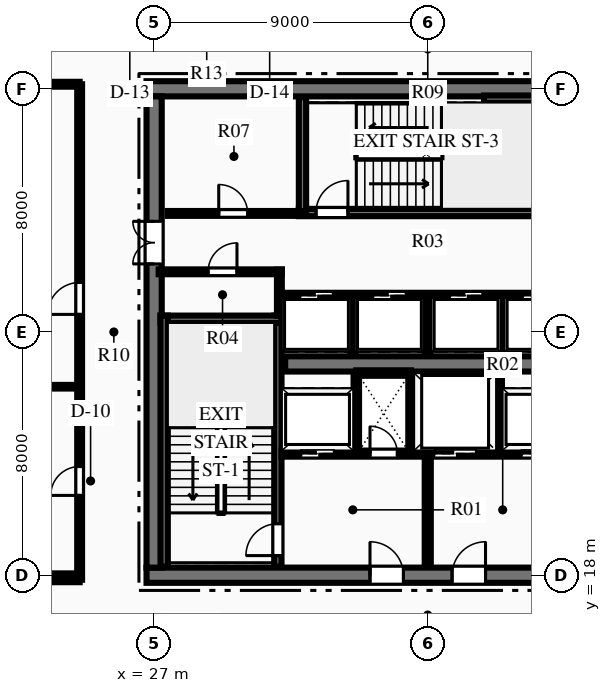
"""IFC4 building model, lengths in metres.
Left out: names, types, materials, properties, quantities, classifications, styles, units other than length and angle.
Written with IfcOpenShell. Run it as: python <this file> out.ifc"""

import sys

from ifc_helpers import new_model, si_unit, direction, frame, frame_2d, origin, place, context, subcontext, project, spatial, rectangle, extrude, element, fill, save


model = new_model("IFC4")
c1 = context("Model", 3, precision=1e-05, world=origin(), true_north=direction((0.0, 1.0)))
c2 = subcontext(c1, "Body", "Model", "MODEL_VIEW")
j1 = project(units=[si_unit("LENGTHUNIT", "METRE"), si_unit("PLANEANGLEUNIT", "RADIAN")], contexts=[c1])
p1 = place(None, origin())
s1 = spatial("IfcSite", under=j1, at=p1, CompositionType="ELEMENT")
p2 = place(p1, origin())
s2 = spatial("IfcBuilding", under=s1, at=p2, CompositionType="ELEMENT")
p3 = place(p2, frame((0.0, 0.0, 198.45)))
s3 = spatial("IfcBuildingStorey", under=s2, at=p3, CompositionType="ELEMENT", Elevation=198.45)
p4 = place(p3, frame((26.75, 18.0, 0.0), z_axis=(0.0, 0.0, 1.0), x_axis=(1.0, 0.0, 0.0)))
e1 = element("IfcWall", 1, at=p4, inside=s3, PredefinedType="SHEAR", context=c2, shape_type="SweptSolid", body=[
    extrude(rectangle(XDim=18.5, YDim=0.5, at=frame_2d((9.25, 0.0))), origin(), (0.0, 0.0, 1.0), 3.75),
])
p5 = place(p4, frame((7.35, 0.0, 0.0)))
e2 = element("IfcOpeningElement", 2, at=p5, cuts=e1, PredefinedType="OPENING", context=c2, shape_type="SweptSolid", body=[
    extrude(rectangle(XDim=1.1, YDim=2.15, at=frame_2d((0.55, 1.075))), frame((0.0, 0.26, 0.0), z_axis=(0.0, -1.0, 0.0), x_axis=(1.0, 0.0, 0.0)), (0.0, 0.0, 1.0), 0.52),
])
p6 = place(p4, frame((10.05, 0.0, 0.0)))
e3 = element("IfcOpeningElement", 3, at=p6, cuts=e1, PredefinedType="OPENING", context=c2, shape_type="SweptSolid", body=[
    extrude(rectangle(XDim=1.1, YDim=2.15, at=frame_2d((0.55, 1.075))), frame((0.0, 0.26, 0.0), z_axis=(0.0, -1.0, 0.0), x_axis=(1.0, 0.0, 0.0)), (0.0, 0.0, 1.0), 0.52),
])
p7 = place(p3, frame((26.75, 34.0, 0.0), z_axis=(0.0, 0.0, 1.0), x_axis=(1.0, 0.0, 0.0)))
e4 = element("IfcWall", 4, at=p7, inside=s3, PredefinedType="SHEAR", context=c2, shape_type="SweptSolid", body=[
    extrude(rectangle(XDim=18.5, YDim=0.5, at=frame_2d((9.25, 0.0))), origin(), (0.0, 0.0, 1.0), 3.75),
])
p8 = place(p7, frame((13.935, 0.0, 0.0)))
e5 = element("IfcOpeningElement", 5, at=p8, cuts=e4, PredefinedType="OPENING", context=c2, shape_type="SweptSolid", body=[
    extrude(rectangle(XDim=1.1, YDim=2.15, at=frame_2d((0.55, 1.075))), frame((0.0, 0.26, 0.0), z_axis=(0.0, -1.0, 0.0), x_axis=(1.0, 0.0, 0.0)), (0.0, 0.0, 1.0), 0.52),
])
p9 = place(p7, frame((16.185, 0.0, 0.0)))
e6 = element("IfcOpeningElement", 6, at=p9, cuts=e4, PredefinedType="OPENING", context=c2, shape_type="SweptSolid", body=[
    extrude(rectangle(XDim=1.1, YDim=2.15, at=frame_2d((0.55, 1.075))), frame((0.0, 0.26, 0.0), z_axis=(0.0, -1.0, 0.0), x_axis=(1.0, 0.0, 0.0)), (0.0, 0.0, 1.0), 0.52),
])
p10 = place(p3, frame((27.0, 18.25, 0.0), z_axis=(0.0, 0.0, 1.0), x_axis=(0.0, 1.0, 0.0)))
e7 = element("IfcWall", 7, at=p10, inside=s3, PredefinedType="SHEAR", context=c2, shape_type="SweptSolid", body=[
    extrude(rectangle(XDim=15.5, YDim=0.5, at=frame_2d((7.75, 0.0))), origin(), (0.0, 0.0, 1.0), 3.75),
])
p11 = place(p10, frame((9.99, 0.0, 0.0)))
e8 = element("IfcOpeningElement", 8, at=p11, cuts=e7, PredefinedType="OPENING", context=c2, shape_type="SweptSolid", body=[
    extrude(rectangle(XDim=1.4, YDim=2.2, at=frame_2d((0.7, 1.1))), frame((0.0, 0.26, 0.0), z_axis=(0.0, -1.0, 0.0), x_axis=(1.0, 0.0, 0.0)), (0.0, 0.0, 1.0), 0.52),
])
p12 = place(p3, frame((31.31, 24.95, 0.0), z_axis=(0.0, 0.0, 1.0), x_axis=(1.0, 0.0, 0.0)))
e9 = element("IfcWall", 9, at=p12, inside=s3, PredefinedType="SHEAR", context=c2, shape_type="SweptSolid", body=[
    extrude(rectangle(XDim=9.38, YDim=0.5, at=frame_2d((4.69, 0.0))), origin(), (0.0, 0.0, 1.0), 3.75),
])
p13 = place(p3, frame((31.07, 18.28, 0.0), z_axis=(0.0, 0.0, 1.0), x_axis=(0.0, 1.0, 0.0)))
e10 = element("IfcWall", 10, at=p13, inside=s3, PredefinedType="SHEAR", context=c2, shape_type="SweptSolid", body=[
    extrude(rectangle(XDim=8.26, YDim=0.24, at=frame_2d((4.13, 0.0))), origin(), (0.0, 0.0, 1.0), 3.75),
])
p14 = place(p13, frame((0.365, 0.0, 0.0)))
e11 = element("IfcOpeningElement", 11, at=p14, cuts=e10, PredefinedType="OPENING", context=c2, shape_type="SweptSolid", body=[
    extrude(rectangle(XDim=1.05, YDim=2.15, at=frame_2d((0.525, 1.075))), frame((0.0, 0.13, 0.0), z_axis=(0.0, -1.0, 0.0), x_axis=(1.0, 0.0, 0.0)), (0.0, 0.0, 1.0), 0.26),
])
p15 = place(p3, frame((27.21, 26.42, 0.0), z_axis=(0.0, 0.0, 1.0), x_axis=(1.0, 0.0, 0.0)))
e12 = element("IfcWall", 12, at=p15, inside=s3, PredefinedType="SHEAR", context=c2, shape_type="SweptSolid", body=[
    extrude(rectangle(XDim=3.98, YDim=0.24, at=frame_2d((1.99, 0.0))), origin(), (0.0, 0.0, 1.0), 3.75),
])
p16 = place(p3, frame((27.33, 18.28, 0.0), z_axis=(0.0, 0.0, 1.0), x_axis=(0.0, 1.0, 0.0)))
e13 = element("IfcWall", 13, at=p16, inside=s3, PredefinedType="SHEAR", context=c2, shape_type="SweptSolid", body=[
    extrude(rectangle(XDim=8.26, YDim=0.24, at=frame_2d((4.13, 0.0))), origin(), (0.0, 0.0, 1.0), 3.75),
])
p17 = place(p3, frame((31.76, 29.93, 0.0), z_axis=(0.0, 0.0, 1.0), x_axis=(1.0, 0.0, 0.0)))
e14 = element("IfcWall", 14, at=p17, inside=s3, PredefinedType="SHEAR", context=c2, shape_type="SweptSolid", body=[
    extrude(rectangle(XDim=8.38, YDim=0.24, at=frame_2d((4.19, 0.0))), origin(), (0.0, 0.0, 1.0), 3.75),
])
p18 = place(p17, frame((0.565, 0.0, 0.0)))
e15 = element("IfcOpeningElement", 15, at=p18, cuts=e14, PredefinedType="OPENING", context=c2, shape_type="SweptSolid", body=[
    extrude(rectangle(XDim=1.05, YDim=2.15, at=frame_2d((0.525, 1.075))), frame((0.0, 0.13, 0.0), z_axis=(0.0, -1.0, 0.0), x_axis=(1.0, 0.0, 0.0)), (0.0, 0.0, 1.0), 0.26),
])
p19 = place(p3, frame((31.88, 29.93, 0.0), z_axis=(0.0, 0.0, 1.0), x_axis=(0.0, 1.0, 0.0)))
e16 = element("IfcWall", 16, at=p19, inside=s3, PredefinedType="SHEAR", context=c2, shape_type="SweptSolid", body=[
    extrude(rectangle(XDim=3.79, YDim=0.24, at=frame_2d((1.895, 0.0))), origin(), (0.0, 0.0, 1.0), 3.75),
])
p20 = place(p3, frame((37.85, 33.66, 0.0), z_axis=(0.0, 0.0, 1.0), x_axis=(1.0, 0.0, 0.0)))
e17 = element("IfcWall", 17, at=p20, inside=s3, PredefinedType="SHEAR", context=c2, shape_type="SweptSolid", body=[
    extrude(rectangle(XDim=2.29, YDim=0.24, at=frame_2d((1.145, 0.0))), origin(), (0.0, 0.0, 1.0), 3.75),
])
p21 = place(p3, frame((36.0, 18.28, 0.0), z_axis=(0.0, 0.0, 1.0), x_axis=(0.0, 1.0, 0.0)))
e18 = element("IfcWall", 18, at=p21, inside=s3, PredefinedType="PARTITIONING", context=c2, shape_type="SweptSolid", body=[
    extrude(rectangle(XDim=3.77, YDim=0.2, at=frame_2d((1.885, 0.0))), origin(), (0.0, 0.0, 1.0), 3.47),
])
p22 = place(p3, frame((31.19, 22.0, 0.0), z_axis=(0.0, 0.0, 1.0), x_axis=(1.0, 0.0, 0.0)))
e19 = element("IfcWall", 19, at=p22, inside=s3, PredefinedType="PARTITIONING", context=c2, shape_type="SweptSolid", body=[
    extrude(rectangle(XDim=4.69, YDim=0.2, at=frame_2d((2.345, 0.0))), origin(), (0.0, 0.0, 1.0), 3.47),
])
p23 = place(p22, frame((2.91, 0.0, 0.0)))
e20 = element("IfcOpeningElement", 20, at=p23, cuts=e19, PredefinedType="OPENING", context=c2, shape_type="SweptSolid", body=[
    extrude(rectangle(XDim=0.9, YDim=2.15, at=frame_2d((0.45, 1.075))), frame((0.0, 0.11, 0.0), z_axis=(0.0, -1.0, 0.0), x_axis=(1.0, 0.0, 0.0)), (0.0, 0.0, 1.0), 0.22),
])
p24 = place(p22, frame((0.635, 0.0, 0.0)))
e21 = element("IfcOpeningElement", 21, at=p24, cuts=e19, PredefinedType="OPENING", context=c2, shape_type="SweptSolid", body=[
    extrude(rectangle(XDim=1.1, YDim=2.15, at=frame_2d((0.55, 1.075))), frame((0.0, 0.11, 0.0), z_axis=(0.0, -1.0, 0.0), x_axis=(1.0, 0.0, 0.0)), (0.0, 0.0, 1.0), 0.22),
])
p25 = place(p3, frame((36.12, 22.0, 0.0), z_axis=(0.0, 0.0, 1.0), x_axis=(1.0, 0.0, 0.0)))
e22 = element("IfcWall", 22, at=p25, inside=s3, PredefinedType="PARTITIONING", context=c2, shape_type="SweptSolid", body=[
    extrude(rectangle(XDim=4.69, YDim=0.2, at=frame_2d((2.345, 0.0))), origin(), (0.0, 0.0, 1.0), 3.47),
])
p26 = place(p25, frame((2.955, 0.0, 0.0)))
e23 = element("IfcOpeningElement", 23, at=p26, cuts=e22, PredefinedType="OPENING", context=c2, shape_type="SweptSolid", body=[
    extrude(rectangle(XDim=1.1, YDim=2.15, at=frame_2d((0.55, 1.075))), frame((0.0, 0.11, 0.0), z_axis=(0.0, -1.0, 0.0), x_axis=(1.0, 0.0, 0.0)), (0.0, 0.0, 1.0), 0.22),
])
p27 = place(p25, frame((0.08, 0.0, 0.0)))
e24 = element("IfcOpeningElement", 24, at=p27, cuts=e22, PredefinedType="OPENING", context=c2, shape_type="SweptSolid", body=[
    extrude(rectangle(XDim=1.4, YDim=2.2, at=frame_2d((0.7, 1.1))), frame((0.0, 0.11, 0.0), z_axis=(0.0, -1.0, 0.0), x_axis=(1.0, 0.0, 0.0)), (0.0, 0.0, 1.0), 0.22),
])
for number, where, z_axis, x_axis in (
    (25, (33.65, 22.05, 0.0), (0.0, 0.0, 1.0), (0.0, 1.0, 0.0)),
    (26, (35.45, 22.05, 0.0), (0.0, 0.0, 1.0), (0.0, 1.0, 0.0)),
):
    element("IfcWall", number, at=place(p3, frame(where, z_axis=z_axis, x_axis=x_axis)), inside=s3, PredefinedType="PARTITIONING", context=c2, shape_type="SweptSolid", body=[
        extrude(rectangle(XDim=2.6, YDim=0.18, at=frame_2d((1.3, 0.0))), origin(), (0.0, 0.0, 1.0), 3.47),
    ])
p28 = place(p3, frame((33.65, 24.65, 0.0), z_axis=(0.0, 0.0, 1.0), x_axis=(1.0, 0.0, 0.0)))
e27 = element("IfcWall", 27, at=p28, inside=s3, PredefinedType="PARTITIONING", context=c2, shape_type="SweptSolid", body=[
    extrude(rectangle(XDim=1.8, YDim=0.18, at=frame_2d((0.9, 0.0))), origin(), (0.0, 0.0, 1.0), 3.47),
])
p29 = place(p3, frame((38.35, 22.05, 0.0), z_axis=(0.0, 0.0, 1.0), x_axis=(0.0, 1.0, 0.0)))
e28 = element("IfcWall", 28, at=p29, inside=s3, PredefinedType="PARTITIONING", context=c2, shape_type="SweptSolid", body=[
    extrude(rectangle(XDim=2.6, YDim=0.18, at=frame_2d((1.3, 0.0))), origin(), (0.0, 0.0, 1.0), 3.47),
])
p30 = place(p3, frame((27.15, 27.98, 0.0), z_axis=(0.0, 0.0, 1.0), x_axis=(1.0, 0.0, 0.0)))
e29 = element("IfcWall", 29, at=p30, inside=s3, PredefinedType="PARTITIONING", context=c2, shape_type="SweptSolid", body=[
    extrude(rectangle(XDim=4.05, YDim=0.16, at=frame_2d((2.025, 0.0))), origin(), (0.0, 0.0, 1.0), 3.47),
])
p31 = place(p30, frame((1.625, 0.0, 0.0)))
e30 = element("IfcOpeningElement", 30, at=p31, cuts=e29, PredefinedType="OPENING", context=c2, shape_type="SweptSolid", body=[
    extrude(rectangle(XDim=0.95, YDim=2.15, at=frame_2d((0.475, 1.075))), frame((0.0, 0.09, 0.0), z_axis=(0.0, -1.0, 0.0), x_axis=(1.0, 0.0, 0.0)), (0.0, 0.0, 1.0), 0.18),
])
p32 = place(p3, frame((31.12, 26.54, 0.0), z_axis=(0.0, 0.0, 1.0), x_axis=(0.0, 1.0, 0.0)))
e31 = element("IfcWall", 31, at=p32, inside=s3, PredefinedType="PARTITIONING", context=c2, shape_type="SweptSolid", body=[
    extrude(rectangle(XDim=1.51, YDim=0.16, at=frame_2d((0.755, 0.0))), origin(), (0.0, 0.0, 1.0), 3.47),
])
p33 = place(p3, frame((27.45, 29.9, 0.0), z_axis=(0.0, 0.0, 1.0), x_axis=(1.0, 0.0, 0.0)))
e32 = element("IfcWall", 32, at=p33, inside=s3, PredefinedType="PARTITIONING", context=c2, shape_type="SweptSolid", body=[
    extrude(rectangle(XDim=4.43, YDim=0.16, at=frame_2d((2.215, 0.0))), origin(), (0.0, 0.0, 1.0), 3.47),
])
p34 = place(p33, frame((1.675, 0.0, 0.0)))
e33 = element("IfcOpeningElement", 33, at=p34, cuts=e32, PredefinedType="OPENING", context=c2, shape_type="SweptSolid", body=[
    extrude(rectangle(XDim=0.95, YDim=2.15, at=frame_2d((0.475, 1.075))), frame((0.0, 0.09, 0.0), z_axis=(0.0, -1.0, 0.0), x_axis=(1.0, 0.0, 0.0)), (0.0, 0.0, 1.0), 0.18),
])
p35 = place(p3, frame((31.2, 27.2, 0.0), z_axis=(0.0, 0.0, 1.0), x_axis=(1.0, 0.0, 0.0)))
e34 = element("IfcWall", 34, at=p35, inside=s3, PredefinedType="PARTITIONING", context=c2, shape_type="SweptSolid", body=[
    extrude(rectangle(XDim=9.6, YDim=0.18, at=frame_2d((4.8, 0.0))), origin(), (0.0, 0.0, 1.0), 3.47),
])
p36 = place(p35, frame((0.59, 0.0, 0.0)))
e35 = element("IfcOpeningElement", 35, at=p36, cuts=e34, PredefinedType="OPENING", context=c2, shape_type="SweptSolid", body=[
    extrude(rectangle(XDim=1.1, YDim=2.15, at=frame_2d((0.55, 1.075))), frame((0.0, 0.1, 0.0), z_axis=(0.0, -1.0, 0.0), x_axis=(1.0, 0.0, 0.0)), (0.0, 0.0, 1.0), 0.2),
])
p37 = place(p35, frame((2.99, 0.0, 0.0)))
e36 = element("IfcOpeningElement", 36, at=p37, cuts=e34, PredefinedType="OPENING", context=c2, shape_type="SweptSolid", body=[
    extrude(rectangle(XDim=1.1, YDim=2.15, at=frame_2d((0.55, 1.075))), frame((0.0, 0.1, 0.0), z_axis=(0.0, -1.0, 0.0), x_axis=(1.0, 0.0, 0.0)), (0.0, 0.0, 1.0), 0.2),
])
p38 = place(p35, frame((5.51, 0.0, 0.0)))
e37 = element("IfcOpeningElement", 37, at=p38, cuts=e34, PredefinedType="OPENING", context=c2, shape_type="SweptSolid", body=[
    extrude(rectangle(XDim=1.1, YDim=2.15, at=frame_2d((0.55, 1.075))), frame((0.0, 0.1, 0.0), z_axis=(0.0, -1.0, 0.0), x_axis=(1.0, 0.0, 0.0)), (0.0, 0.0, 1.0), 0.2),
])
p39 = place(p35, frame((7.91, 0.0, 0.0)))
e38 = element("IfcOpeningElement", 38, at=p39, cuts=e34, PredefinedType="OPENING", context=c2, shape_type="SweptSolid", body=[
    extrude(rectangle(XDim=1.1, YDim=2.15, at=frame_2d((0.55, 1.075))), frame((0.0, 0.1, 0.0), z_axis=(0.0, -1.0, 0.0), x_axis=(1.0, 0.0, 0.0)), (0.0, 0.0, 1.0), 0.2),
])
for number, where, z_axis, x_axis in (
    (39, (33.54, 25.3, 0.0), (0.0, 0.0, 1.0), (0.0, 1.0, 0.0)),
    (40, (36.0, 25.3, 0.0), (0.0, 0.0, 1.0), (0.0, 1.0, 0.0)),
    (41, (38.46, 25.3, 0.0), (0.0, 0.0, 1.0), (0.0, 1.0, 0.0)),
):
    element("IfcWall", number, at=place(p3, frame(where, z_axis=z_axis, x_axis=x_axis)), inside=s3, PredefinedType="PARTITIONING", context=c2, shape_type="SweptSolid", body=[
        extrude(rectangle(XDim=1.9, YDim=0.18, at=frame_2d((0.95, 0.0))), origin(), (0.0, 0.0, 1.0), 3.47),
    ])
for number, where, z_axis, x_axis in (
    (42, (18.2, 17.85, 0.0), (0.0, 0.0, 1.0), (1.0, 0.0, 0.0)),
    (43, (18.2, 34.15, 0.0), (0.0, 0.0, 1.0), (1.0, 0.0, 0.0)),
):
    element("IfcWall", number, at=place(p3, frame(where, z_axis=z_axis, x_axis=x_axis)), inside=s3, PredefinedType="PARTITIONING", context=c2, shape_type="SweptSolid", body=[
        extrude(rectangle(XDim=6.35, YDim=0.16, at=frame_2d((3.175, 0.0))), origin(), (0.0, 0.0, 1.0), 3.47),
    ])
p40 = place(p3, frame((24.55, 17.85, 0.0), z_axis=(0.0, 0.0, 1.0), x_axis=(0.0, 1.0, 0.0)))
e44 = element("IfcWall", 44, at=p40, inside=s3, PredefinedType="PARTITIONING", context=c2, shape_type="SweptSolid", body=[
    extrude(rectangle(XDim=16.3, YDim=0.16, at=frame_2d((8.15, 0.0))), origin(), (0.0, 0.0, 1.0), 3.47),
])
p41 = place(p40, frame((2.775, 0.0, 0.0)))
e45 = element("IfcOpeningElement", 45, at=p41, cuts=e44, PredefinedType="OPENING", context=c2, shape_type="SweptSolid", body=[
    extrude(rectangle(XDim=0.95, YDim=2.15, at=frame_2d((0.475, 1.075))), frame((0.0, 0.09, 0.0), z_axis=(0.0, -1.0, 0.0), x_axis=(1.0, 0.0, 0.0)), (0.0, 0.0, 1.0), 0.18),
])
p42 = place(p40, frame((8.729, 0.0, 0.0)))
e46 = element("IfcOpeningElement", 46, at=p42, cuts=e44, PredefinedType="OPENING", context=c2, shape_type="SweptSolid", body=[
    extrude(rectangle(XDim=1.05, YDim=2.15, at=frame_2d((0.525, 1.075))), frame((0.0, 0.09, 0.0), z_axis=(0.0, -1.0, 0.0), x_axis=(1.0, 0.0, 0.0)), (0.0, 0.0, 1.0), 0.18),
])
for number, where, z_axis, x_axis in (
    (47, (20.2, 18.0, 0.0), (0.0, 0.0, 1.0), (1.0, 0.0, 0.0)),
    (48, (20.2, 24.2, 0.0), (0.0, 0.0, 1.0), (1.0, 0.0, 0.0)),
):
    element("IfcWall", number, at=place(p3, frame(where, z_axis=z_axis, x_axis=x_axis)), inside=s3, PredefinedType="PARTITIONING", context=c2, shape_type="SweptSolid", body=[
        extrude(rectangle(XDim=4.35, YDim=0.12, at=frame_2d((2.175, 0.0))), origin(), (0.0, 0.0, 1.0), 3.47),
    ])
p43 = place(p31, origin())
e49 = element("IfcDoor", 49, at=p43, inside=s3, OperationType="SINGLE_SWING_RIGHT", PredefinedType="DOOR", context=c2, shape_type="SweptSolid", body=[
    extrude(rectangle(XDim=0.95, YDim=2.15, at=frame_2d((0.475, 1.075))), frame((0.0, 0.025, 0.0), z_axis=(0.0, -1.0, 0.0), x_axis=(1.0, 0.0, 0.0)), (0.0, 0.0, 1.0), 0.05),
])
fill(e30, e49)
p44 = place(p34, origin())
e50 = element("IfcDoor", 50, at=p44, inside=s3, OperationType="SINGLE_SWING_LEFT", PredefinedType="DOOR", context=c2, shape_type="SweptSolid", body=[
    extrude(rectangle(XDim=0.95, YDim=2.15, at=frame_2d((0.475, 1.075))), frame((0.0, 0.025, 0.0), z_axis=(0.0, -1.0, 0.0), x_axis=(1.0, 0.0, 0.0)), (0.0, 0.0, 1.0), 0.05),
])
fill(e33, e50)
p45 = place(p14, origin())
e51 = element("IfcDoor", 51, at=p45, inside=s3, OperationType="SINGLE_SWING_LEFT", PredefinedType="DOOR", context=c2, shape_type="SweptSolid", body=[
    extrude(rectangle(XDim=1.05, YDim=2.15, at=frame_2d((0.525, 1.075))), frame((0.0, 0.025, 0.0), z_axis=(0.0, -1.0, 0.0), x_axis=(1.0, 0.0, 0.0)), (0.0, 0.0, 1.0), 0.05),
])
fill(e11, e51)
p46 = place(p18, origin())
e52 = element("IfcDoor", 52, at=p46, inside=s3, OperationType="SINGLE_SWING_RIGHT", PredefinedType="DOOR", context=c2, shape_type="SweptSolid", body=[
    extrude(rectangle(XDim=1.05, YDim=2.15, at=frame_2d((0.525, 1.075))), frame((0.0, 0.025, 0.0), z_axis=(0.0, -1.0, 0.0), x_axis=(1.0, 0.0, 0.0)), (0.0, 0.0, 1.0), 0.05),
])
fill(e15, e52)
p47 = place(p5, origin())
e53 = element("IfcDoor", 53, at=p47, inside=s3, OperationType="SINGLE_SWING_LEFT", PredefinedType="DOOR", context=c2, shape_type="SweptSolid", body=[
    extrude(rectangle(XDim=1.1, YDim=2.15, at=frame_2d((0.55, 1.075))), frame((0.0, 0.025, 0.0), z_axis=(0.0, -1.0, 0.0), x_axis=(1.0, 0.0, 0.0)), (0.0, 0.0, 1.0), 0.05),
])
fill(e2, e53)
p48 = place(p6, origin())
e54 = element("IfcDoor", 54, at=p48, inside=s3, OperationType="SINGLE_SWING_RIGHT", PredefinedType="DOOR", context=c2, shape_type="SweptSolid", body=[
    extrude(rectangle(XDim=1.1, YDim=2.15, at=frame_2d((0.55, 1.075))), frame((0.0, 0.025, 0.0), z_axis=(0.0, -1.0, 0.0), x_axis=(1.0, 0.0, 0.0)), (0.0, 0.0, 1.0), 0.05),
])
fill(e3, e54)
p49 = place(p23, origin())
e55 = element("IfcDoor", 55, at=p49, inside=s3, OperationType="SINGLE_SWING_LEFT", PredefinedType="DOOR", context=c2, shape_type="SweptSolid", body=[
    extrude(rectangle(XDim=0.9, YDim=2.15, at=frame_2d((0.45, 1.075))), frame((0.0, 0.025, 0.0), z_axis=(0.0, -1.0, 0.0), x_axis=(1.0, 0.0, 0.0)), (0.0, 0.0, 1.0), 0.05),
])
fill(e20, e55)
p50 = place(p11, origin())
e56 = element("IfcDoor", 56, at=p50, inside=s3, OperationType="DOUBLE_DOOR_SINGLE_SWING", PredefinedType="DOOR", context=c2, shape_type="SweptSolid", body=[
    extrude(rectangle(XDim=1.4, YDim=2.2, at=frame_2d((0.7, 1.1))), frame((0.0, 0.025, 0.0), z_axis=(0.0, -1.0, 0.0), x_axis=(1.0, 0.0, 0.0)), (0.0, 0.0, 1.0), 0.05),
])
fill(e8, e56)
p51 = place(p41, origin())
e57 = element("IfcDoor", 57, at=p51, inside=s3, OperationType="SINGLE_SWING_LEFT", PredefinedType="DOOR", context=c2, shape_type="SweptSolid", body=[
    extrude(rectangle(XDim=0.95, YDim=2.15, at=frame_2d((0.475, 1.075))), frame((0.0, 0.025, 0.0), z_axis=(0.0, -1.0, 0.0), x_axis=(1.0, 0.0, 0.0)), (0.0, 0.0, 1.0), 0.05),
])
fill(e45, e57)
p52 = place(p42, origin())
e58 = element("IfcDoor", 58, at=p52, inside=s3, OperationType="SINGLE_SWING_LEFT", PredefinedType="DOOR", context=c2, shape_type="SweptSolid", body=[
    extrude(rectangle(XDim=1.05, YDim=2.15, at=frame_2d((0.525, 1.075))), frame((0.0, 0.025, 0.0), z_axis=(0.0, -1.0, 0.0), x_axis=(1.0, 0.0, 0.0)), (0.0, 0.0, 1.0), 0.05),
])
fill(e46, e58)
p53 = place(p36, origin())
e59 = element("IfcDoor", 59, at=p53, inside=s3, OperationType="SLIDING_TO_LEFT", PredefinedType="DOOR", context=c2, shape_type="SweptSolid", body=[
    extrude(rectangle(XDim=1.1, YDim=2.15, at=frame_2d((0.55, 1.075))), frame((0.0, 0.025, 0.0), z_axis=(0.0, -1.0, 0.0), x_axis=(1.0, 0.0, 0.0)), (0.0, 0.0, 1.0), 0.05),
])
fill(e35, e59)
p54 = place(p37, origin())
e60 = element("IfcDoor", 60, at=p54, inside=s3, OperationType="SLIDING_TO_LEFT", PredefinedType="DOOR", context=c2, shape_type="SweptSolid", body=[
    extrude(rectangle(XDim=1.1, YDim=2.15, at=frame_2d((0.55, 1.075))), frame((0.0, 0.025, 0.0), z_axis=(0.0, -1.0, 0.0), x_axis=(1.0, 0.0, 0.0)), (0.0, 0.0, 1.0), 0.05),
])
fill(e36, e60)
p55 = place(p38, origin())
e61 = element("IfcDoor", 61, at=p55, inside=s3, OperationType="SLIDING_TO_LEFT", PredefinedType="DOOR", context=c2, shape_type="SweptSolid", body=[
    extrude(rectangle(XDim=1.1, YDim=2.15, at=frame_2d((0.55, 1.075))), frame((0.0, 0.025, 0.0), z_axis=(0.0, -1.0, 0.0), x_axis=(1.0, 0.0, 0.0)), (0.0, 0.0, 1.0), 0.05),
])
fill(e37, e61)
p56 = place(p39, origin())
e62 = element("IfcDoor", 62, at=p56, inside=s3, OperationType="SLIDING_TO_LEFT", PredefinedType="DOOR", context=c2, shape_type="SweptSolid", body=[
    extrude(rectangle(XDim=1.1, YDim=2.15, at=frame_2d((0.55, 1.075))), frame((0.0, 0.025, 0.0), z_axis=(0.0, -1.0, 0.0), x_axis=(1.0, 0.0, 0.0)), (0.0, 0.0, 1.0), 0.05),
])
fill(e38, e62)
p57 = place(p24, origin())
e63 = element("IfcDoor", 63, at=p57, inside=s3, OperationType="SLIDING_TO_LEFT", PredefinedType="DOOR", context=c2, shape_type="SweptSolid", body=[
    extrude(rectangle(XDim=1.1, YDim=2.15, at=frame_2d((0.55, 1.075))), frame((0.0, 0.025, 0.0), z_axis=(0.0, -1.0, 0.0), x_axis=(1.0, 0.0, 0.0)), (0.0, 0.0, 1.0), 0.05),
])
fill(e21, e63)
p58 = place(p26, origin())
e64 = element("IfcDoor", 64, at=p58, inside=s3, OperationType="SLIDING_TO_LEFT", PredefinedType="DOOR", context=c2, shape_type="SweptSolid", body=[
    extrude(rectangle(XDim=1.1, YDim=2.15, at=frame_2d((0.55, 1.075))), frame((0.0, 0.025, 0.0), z_axis=(0.0, -1.0, 0.0), x_axis=(1.0, 0.0, 0.0)), (0.0, 0.0, 1.0), 0.05),
])
fill(e23, e64)
p59 = place(p27, origin())
e65 = element("IfcDoor", 65, at=p59, inside=s3, OperationType="SLIDING_TO_LEFT", PredefinedType="DOOR", context=c2, shape_type="SweptSolid", body=[
    extrude(rectangle(XDim=1.4, YDim=2.2, at=frame_2d((0.7, 1.1))), frame((0.0, 0.025, 0.0), z_axis=(0.0, -1.0, 0.0), x_axis=(1.0, 0.0, 0.0)), (0.0, 0.0, 1.0), 0.05),
])
fill(e24, e65)
save(model, sys.argv[1])
